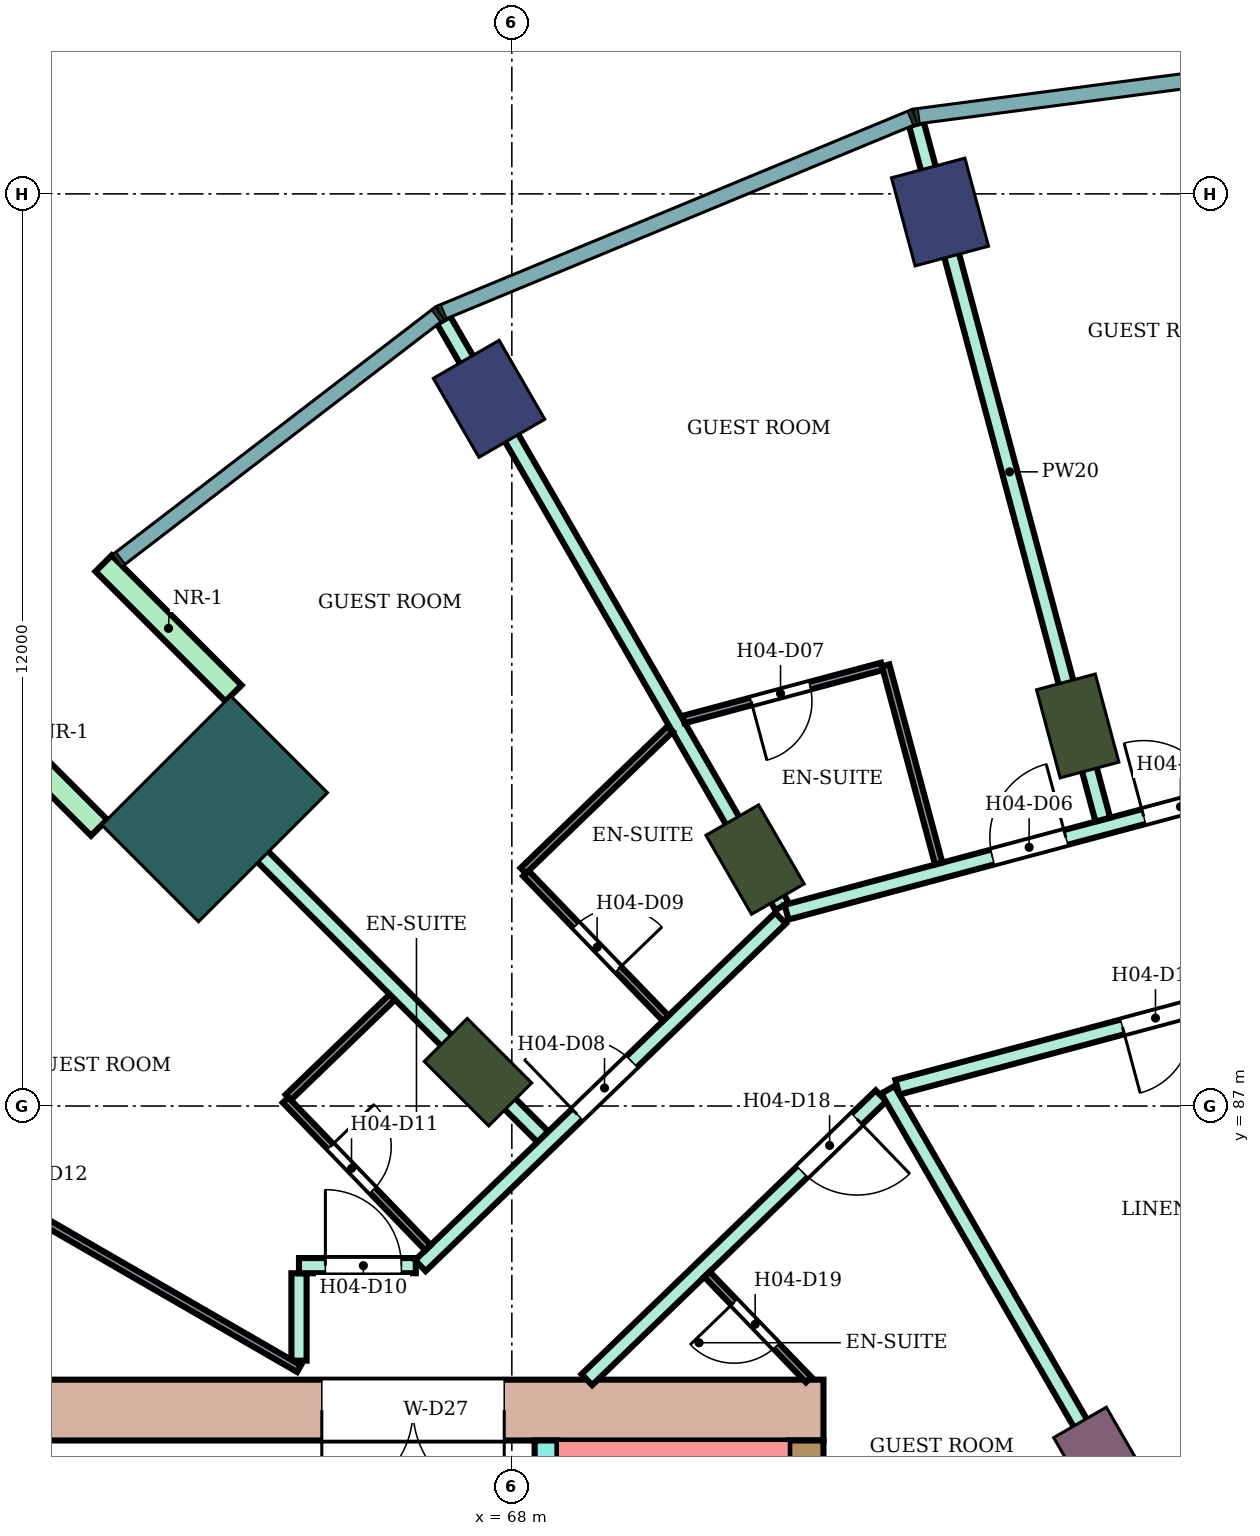
"""IFC4 building model, lengths in metres.
Left out: names, types, materials, properties, quantities, classifications, styles, units other than length and angle.
Written with IfcOpenShell. Run it as: python <this file> out.ifc"""

import sys

from ifc_helpers import new_model, si_unit, direction, frame, frame_2d, origin, origin_2d, place, context, subcontext, project, spatial, rectangle, extrude, element, fill, save


model = new_model("IFC4")
c1 = context("Model", 3, precision=1e-05, world=origin(), true_north=direction((0.0, 1.0)))
c2 = subcontext(c1, "Body", "Model", "MODEL_VIEW")
j1 = project(units=[si_unit("LENGTHUNIT", "METRE"), si_unit("PLANEANGLEUNIT", "RADIAN")], contexts=[c1])
p1 = place(None, origin())
s1 = spatial("IfcSite", under=j1, at=p1, CompositionType="ELEMENT")
p2 = place(p1, origin())
s2 = spatial("IfcBuilding", under=s1, at=p2, CompositionType="ELEMENT")
p3 = place(p2, frame((0.0, 0.0, 70.6)))
s3 = spatial("IfcBuildingStorey", under=s2, at=p3, CompositionType="ELEMENT", Elevation=70.6)
for number, where, z_axis, x_axis in (
    (1, (73.633, 98.762, 0.0), (0.0, 0.0, 1.0), (-0.259, 0.966, 0.0)),
    (2, (67.7, 96.304, 0.0), (0.0, 0.0, 1.0), (-0.5, 0.866, 0.0)),
):
    element("IfcColumn", number, at=place(p3, frame(where, z_axis=z_axis, x_axis=x_axis)), inside=s3, PredefinedType="COLUMN", context=c2, shape_type="SweptSolid", body=[
        extrude(rectangle(XDim=1.2, YDim=1.0, at=origin_2d()), origin(), (0.0, 0.0, 1.0), 3.8),
    ])
for number, where, z_axis, x_axis in (
    (3, (75.445, 92.0, 0.0), (0.0, 0.0, 1.0), (-0.259, 0.966, 0.0)),
    (4, (71.2, 90.242, 0.0), (0.0, 0.0, 1.0), (-0.5, 0.866, 0.0)),
    (5, (67.555, 87.445, 0.0), (0.0, 0.0, 1.0), (-0.707, 0.707, 0.0)),
):
    element("IfcColumn", number, at=place(p3, frame(where, z_axis=z_axis, x_axis=x_axis)), inside=s3, PredefinedType="COLUMN", context=c2, shape_type="SweptSolid", body=[
        extrude(rectangle(XDim=1.2, YDim=0.8, at=origin_2d()), origin(), (0.0, 0.0, 1.0), 3.8),
    ])
p4 = place(p3, frame((75.7, 82.448, 0.0), z_axis=(0.0, 0.0, 1.0), x_axis=(-0.5, 0.866025403784, 0.0)))
e6 = element("IfcColumn", 6, at=p4, inside=s3, PredefinedType="COLUMN", context=c2, shape_type="SweptSolid", body=[
    extrude(rectangle(XDim=0.9, YDim=0.8, at=origin_2d()), origin(), (0.0, 0.0, 1.0), 3.8),
])
p5 = place(p3, frame((64.09, 90.91, 0.0), z_axis=(0.0, 0.0, 1.0), x_axis=(-0.707106781187, 0.707106781187, 0.0)))
e7 = element("IfcColumn", 7, at=p5, inside=s3, PredefinedType="COLUMN", context=c2, shape_type="SweptSolid", body=[
    extrude(rectangle(XDim=1.8, YDim=2.4, at=origin_2d()), origin(), (0.0, 0.0, 1.0), 3.8),
])
p6 = place(p3, frame((72.1, 83.0, 0.0), z_axis=(0.0, 0.0, 1.0), x_axis=(-1.0, 0.0, 0.0)))
e8 = element("IfcWall", 8, at=p6, inside=s3, PredefinedType="SHEAR", context=c2, shape_type="SweptSolid", body=[
    extrude(rectangle(XDim=14.7, YDim=0.8, at=frame_2d((7.35, 0.0))), origin(), (0.0, 0.0, 1.0), 3.4),
])
p7 = place(p6, frame((4.2, 0.0, 0.0)))
e9 = element("IfcOpeningElement", 9, at=p7, cuts=e8, PredefinedType="OPENING", context=c2, shape_type="SweptSolid", body=[
    extrude(rectangle(XDim=2.4, YDim=2.4, at=frame_2d((1.2, 1.2))), frame((0.0, 0.41, 0.0), z_axis=(0.0, -1.0, 0.0), x_axis=(1.0, 0.0, 0.0)), (0.0, 0.0, 1.0), 0.82),
])
p8 = place(p3, frame((71.875, 82.6, 0.0), z_axis=(0.0, 0.0, 1.0), x_axis=(0.0, -1.0, 0.0)))
e10 = element("IfcWall", 10, at=p8, inside=s3, PredefinedType="SHEAR", context=c2, shape_type="SweptSolid", body=[
    extrude(rectangle(XDim=7.6, YDim=0.45, at=frame_2d((3.8, 0.0))), origin(), (0.0, 0.0, 1.0), 3.4),
])
p9 = place(p3, frame((68.45, 82.6, 0.0), z_axis=(0.0, 0.0, 1.0), x_axis=(0.0, -1.0, 0.0)))
e11 = element("IfcWall", 11, at=p9, inside=s3, PredefinedType="SHEAR", context=c2, shape_type="SweptSolid", body=[
    extrude(rectangle(XDim=7.6, YDim=0.3, at=frame_2d((3.8, 0.0))), origin(), (0.0, 0.0, 1.0), 3.4),
])
p10 = place(p9, frame((0.25, 0.0, 0.0)))
e12 = element("IfcOpeningElement", 12, at=p10, cuts=e11, PredefinedType="OPENING", context=c2, shape_type="SweptSolid", body=[
    extrude(rectangle(XDim=0.9, YDim=2.1, at=frame_2d((0.45, 1.05))), frame((0.0, 0.16, 0.0), z_axis=(0.0, -1.0, 0.0), x_axis=(1.0, 0.0, 0.0)), (0.0, 0.0, 1.0), 0.32),
])
for number, where, z_axis, x_axis in (
    (13, (64.338, 92.43, 0.0), (0.0, 0.0, 1.0), (-0.707, 0.707, 0.0)),
    (14, (62.57, 90.662, 0.0), (0.0, 0.0, 1.0), (-0.707, 0.707, 0.0)),
):
    element("IfcWall", number, at=place(p3, frame(where, z_axis=z_axis, x_axis=x_axis)), inside=s3, PredefinedType="NOTDEFINED", context=c2, shape_type="SweptSolid", body=[
        extrude(rectangle(XDim=2.416, YDim=0.3, at=frame_2d((1.208, 0.0))), origin(), (0.0, 0.0, 1.0), 3.8),
    ])
p11 = place(p3, frame((80.0, 82.604, 0.0), z_axis=(0.0, 0.0, 1.0), x_axis=(-0.965933654434, -0.258789828301, 0.0)))
e15 = element("IfcWall", 15, at=p11, inside=s3, PredefinedType="NOTDEFINED", context=c2, shape_type="SweptSolid", body=[
    extrude(rectangle(XDim=3.936, YDim=0.2, at=frame_2d((1.968, 0.0))), origin(), (0.0, 0.0, 1.0), 3.8),
])
p12 = place(p11, frame((0.468, 0.0, 0.9)))
e16 = element("IfcOpeningElement", 16, at=p12, cuts=e15, PredefinedType="OPENING", context=c2, shape_type="SweptSolid", body=[
    extrude(rectangle(XDim=3.0, YDim=2.3, at=frame_2d((1.5, 1.15))), frame((0.0, 0.11, 0.0), z_axis=(0.0, -1.0, 0.0), x_axis=(1.0, 0.0, 0.0)), (0.0, 0.0, 1.0), 0.22),
])
p13 = place(p3, frame((63.598, 91.407, 0.0), z_axis=(0.0, 0.0, 1.0), x_axis=(0.706981202484, -0.707232337591, 0.0)))
e17 = element("IfcWall", 17, at=p13, inside=s3, PredefinedType="PARTITIONING", context=c2, shape_type="SweptSolid", body=[
    extrude(rectangle(XDim=6.805, YDim=0.2, at=frame_2d((3.402, 0.0))), origin(), (0.0, 0.0, 1.0), 3.35),
])
p14 = place(p3, frame((65.2, 83.65, 0.0), z_axis=(0.0, 0.0, 1.0), x_axis=(0.0, 1.0, 0.0)))
e18 = element("IfcWall", 18, at=p14, inside=s3, PredefinedType="PARTITIONING", context=c2, shape_type="SweptSolid", body=[
    extrude(rectangle(XDim=1.15, YDim=0.2, at=frame_2d((0.575, 0.0))), origin(), (0.0, 0.0, 1.0), 3.35),
])
p15 = place(p3, frame((65.2, 84.9, 0.0), z_axis=(0.0, 0.0, 1.0), x_axis=(1.0, 0.0, 0.0)))
e19 = element("IfcWall", 19, at=p15, inside=s3, PredefinedType="PARTITIONING", context=c2, shape_type="SweptSolid", body=[
    extrude(rectangle(XDim=1.537, YDim=0.2, at=frame_2d((0.769, 0.0))), origin(), (0.0, 0.0, 1.0), 3.35),
])
p16 = place(p15, frame((0.347, 0.0, 0.0)))
e20 = element("IfcOpeningElement", 20, at=p16, cuts=e19, PredefinedType="OPENING", context=c2, shape_type="SweptSolid", body=[
    extrude(rectangle(XDim=1.0, YDim=2.1, at=frame_2d((0.5, 1.05))), frame((0.0, 0.11, 0.0), z_axis=(0.0, -1.0, 0.0), x_axis=(1.0, 0.0, 0.0)), (0.0, 0.0, 1.0), 0.22),
])
p17 = place(p3, frame((66.797, 84.9, 0.0), z_axis=(0.0, 0.0, 1.0), x_axis=(0.719692092412, 0.694293376116, 0.0)))
e21 = element("IfcWall", 21, at=p17, inside=s3, PredefinedType="PARTITIONING", context=c2, shape_type="SweptSolid", body=[
    extrude(rectangle(XDim=6.584, YDim=0.2, at=frame_2d((3.292, 0.0))), origin(), (0.0, 0.0, 1.0), 3.35),
])
p18 = place(p17, frame((2.866, 0.0, 0.0)))
e22 = element("IfcOpeningElement", 22, at=p18, cuts=e21, PredefinedType="OPENING", context=c2, shape_type="SweptSolid", body=[
    extrude(rectangle(XDim=1.0, YDim=2.1, at=frame_2d((0.5, 1.05))), frame((0.0, 0.11, 0.0), z_axis=(0.0, -1.0, 0.0), x_axis=(1.0, 0.0, 0.0)), (0.0, 0.0, 1.0), 0.22),
])
p19 = place(p3, frame((67.101, 97.342, 0.0), z_axis=(0.0, 0.0, 1.0), x_axis=(0.499932813297, -0.866064190571, 0.0)))
e23 = element("IfcWall", 23, at=p19, inside=s3, PredefinedType="PARTITIONING", context=c2, shape_type="SweptSolid", body=[
    extrude(rectangle(XDim=8.908, YDim=0.2, at=frame_2d((4.454, 0.0))), origin(), (0.0, 0.0, 1.0), 3.35),
])
p20 = place(p3, frame((68.987, 83.4, 0.0), z_axis=(0.0, 0.0, 1.0), x_axis=(0.719591503389, 0.694397629784, 0.0)))
e24 = element("IfcWall", 24, at=p20, inside=s3, PredefinedType="PARTITIONING", context=c2, shape_type="SweptSolid", body=[
    extrude(rectangle(XDim=5.378, YDim=0.2, at=frame_2d((2.689, 0.0))), origin(), (0.0, 0.0, 1.0), 3.35),
])
p21 = place(p20, frame((3.938, 0.0, 0.0)))
e25 = element("IfcOpeningElement", 25, at=p21, cuts=e24, PredefinedType="OPENING", context=c2, shape_type="SweptSolid", body=[
    extrude(rectangle(XDim=1.0, YDim=2.1, at=frame_2d((0.5, 1.05))), frame((0.0, 0.11, 0.0), z_axis=(0.0, -1.0, 0.0), x_axis=(1.0, 0.0, 0.0)), (0.0, 0.0, 1.0), 0.22),
])
p22 = place(p3, frame((71.614, 89.55, 0.0), z_axis=(0.0, 0.0, 1.0), x_axis=(0.965982156828, 0.258608725086, 0.0)))
e26 = element("IfcWall", 26, at=p22, inside=s3, PredefinedType="PARTITIONING", context=c2, shape_type="SweptSolid", body=[
    extrude(rectangle(XDim=8.592, YDim=0.2, at=frame_2d((4.296, 0.0))), origin(), (0.0, 0.0, 1.0), 3.35),
])
p23 = place(p22, frame((4.865, 0.0, 0.0)))
e27 = element("IfcOpeningElement", 27, at=p23, cuts=e26, PredefinedType="OPENING", context=c2, shape_type="SweptSolid", body=[
    extrude(rectangle(XDim=1.0, YDim=2.1, at=frame_2d((0.5, 1.05))), frame((0.0, 0.11, 0.0), z_axis=(0.0, -1.0, 0.0), x_axis=(1.0, 0.0, 0.0)), (0.0, 0.0, 1.0), 0.22),
])
p24 = place(p22, frame((2.804, 0.0, 0.0)))
e28 = element("IfcOpeningElement", 28, at=p24, cuts=e26, PredefinedType="OPENING", context=c2, shape_type="SweptSolid", body=[
    extrude(rectangle(XDim=1.0, YDim=2.1, at=frame_2d((0.5, 1.05))), frame((0.0, 0.11, 0.0), z_axis=(0.0, -1.0, 0.0), x_axis=(1.0, 0.0, 0.0)), (0.0, 0.0, 1.0), 0.22),
])
p25 = place(p3, frame((73.071, 87.247, 0.0), z_axis=(0.0, 0.0, 1.0), x_axis=(0.965914318977, 0.258861987157, 0.0)))
e29 = element("IfcWall", 29, at=p25, inside=s3, PredefinedType="PARTITIONING", context=c2, shape_type="SweptSolid", body=[
    extrude(rectangle(XDim=7.043, YDim=0.2, at=frame_2d((3.521, 0.0))), origin(), (0.0, 0.0, 1.0), 3.35),
])
p26 = place(p25, frame((3.067, 0.0, 0.0)))
e30 = element("IfcOpeningElement", 30, at=p26, cuts=e29, PredefinedType="OPENING", context=c2, shape_type="SweptSolid", body=[
    extrude(rectangle(XDim=0.9, YDim=2.1, at=frame_2d((0.45, 1.05))), frame((0.0, 0.11, 0.0), z_axis=(0.0, -1.0, 0.0), x_axis=(1.0, 0.0, 0.0)), (0.0, 0.0, 1.0), 0.22),
])
p27 = place(p3, frame((72.948, 87.214, 0.0), z_axis=(0.0, 0.0, 1.0), x_axis=(0.499927021214, -0.866067534006, 0.0)))
e31 = element("IfcWall", 31, at=p27, inside=s3, PredefinedType="PARTITIONING", context=c2, shape_type="SweptSolid", body=[
    extrude(rectangle(XDim=6.405, YDim=0.2, at=frame_2d((3.203, 0.0))), origin(), (0.0, 0.0, 1.0), 3.35),
])
p28 = place(p3, frame((73.323, 99.919, 0.0), z_axis=(0.0, 0.0, 1.0), x_axis=(0.258817230439, -0.965926312525, 0.0)))
e32 = element("IfcWall", 32, at=p28, inside=s3, PredefinedType="PARTITIONING", context=c2, shape_type="SweptSolid", body=[
    extrude(rectangle(XDim=9.474, YDim=0.2, at=frame_2d((4.737, 0.0))), origin(), (0.0, 0.0, 1.0), 3.35),
])
p29 = place(p3, frame((57.659, 87.899, 0.0), z_axis=(0.0, 0.0, 1.0), x_axis=(0.86602264145, -0.500004784474, 0.0)))
e33 = element("IfcWall", 33, at=p29, inside=s3, PredefinedType="PARTITIONING", context=c2, shape_type="SweptSolid", body=[
    extrude(rectangle(XDim=8.708, YDim=0.1, at=frame_2d((4.354, 0.0))), origin(), (0.0, 0.0, 1.0), 3.35),
])
p30 = place(p29, frame((3.929, 0.0, 0.0)))
e34 = element("IfcOpeningElement", 34, at=p30, cuts=e33, PredefinedType="OPENING", context=c2, shape_type="SweptSolid", body=[
    extrude(rectangle(XDim=0.9, YDim=2.1, at=frame_2d((0.45, 1.05))), frame((0.0, 0.06, 0.0), z_axis=(0.0, -1.0, 0.0), x_axis=(1.0, 0.0, 0.0)), (0.0, 0.0, 1.0), 0.12),
])
p31 = place(p3, frame((65.059, 87.114, 0.0), z_axis=(0.0, 0.0, 1.0), x_axis=(0.719715847356, 0.694268751324, 0.0)))
e35 = element("IfcWall", 35, at=p31, inside=s3, PredefinedType="PARTITIONING", context=c2, shape_type="SweptSolid", body=[
    extrude(rectangle(XDim=1.9, YDim=0.1, at=frame_2d((0.95, 0.0))), origin(), (0.0, 0.0, 1.0), 3.35),
])
p32 = place(p3, frame((65.023, 87.079, 0.0), z_axis=(0.0, 0.0, 1.0), x_axis=(0.694287838235, -0.719697434815, 0.0)))
e36 = element("IfcWall", 36, at=p32, inside=s3, PredefinedType="PARTITIONING", context=c2, shape_type="SweptSolid", body=[
    extrude(rectangle(XDim=2.7, YDim=0.1, at=frame_2d((1.35, 0.0))), origin(), (0.0, 0.0, 1.0), 3.35),
])
p33 = place(p32, frame((0.85, 0.0, 0.0)))
e37 = element("IfcOpeningElement", 37, at=p33, cuts=e36, PredefinedType="OPENING", context=c2, shape_type="SweptSolid", body=[
    extrude(rectangle(XDim=0.8, YDim=2.1, at=frame_2d((0.4, 1.05))), frame((0.0, 0.06, 0.0), z_axis=(0.0, -1.0, 0.0), x_axis=(1.0, 0.0, 0.0)), (0.0, 0.0, 1.0), 0.12),
])
p34 = place(p3, frame((68.185, 90.06, 0.0), z_axis=(0.0, 0.0, 1.0), x_axis=(0.69446127412, -0.719530081892, 0.0)))
e38 = element("IfcWall", 38, at=p34, inside=s3, PredefinedType="PARTITIONING", context=c2, shape_type="SweptSolid", body=[
    extrude(rectangle(XDim=2.649, YDim=0.1, at=frame_2d((1.324, 0.0))), origin(), (0.0, 0.0, 1.0), 3.35),
])
p35 = place(p34, frame((0.95, 0.0, 0.0)))
e39 = element("IfcOpeningElement", 39, at=p35, cuts=e38, PredefinedType="OPENING", context=c2, shape_type="SweptSolid", body=[
    extrude(rectangle(XDim=0.8, YDim=2.1, at=frame_2d((0.4, 1.05))), frame((0.0, 0.06, 0.0), z_axis=(0.0, -1.0, 0.0), x_axis=(1.0, 0.0, 0.0)), (0.0, 0.0, 1.0), 0.12),
])
p36 = place(p3, frame((68.15, 90.096, 0.0), z_axis=(0.0, 0.0, 1.0), x_axis=(0.719669144226, 0.694317163009, 0.0)))
e40 = element("IfcWall", 40, at=p36, inside=s3, PredefinedType="PARTITIONING", context=c2, shape_type="SweptSolid", body=[
    extrude(rectangle(XDim=2.687, YDim=0.1, at=frame_2d((1.343, 0.0))), origin(), (0.0, 0.0, 1.0), 3.35),
])
p37 = place(p3, frame((70.258, 92.085, 0.0), z_axis=(0.0, 0.0, 1.0), x_axis=(0.965948051503, 0.258736085224, 0.0)))
e41 = element("IfcWall", 41, at=p37, inside=s3, PredefinedType="PARTITIONING", context=c2, shape_type="SweptSolid", body=[
    extrude(rectangle(XDim=2.703, YDim=0.1, at=frame_2d((1.352, 0.0))), origin(), (0.0, 0.0, 1.0), 3.35),
])
p38 = place(p37, frame((0.922, 0.0, 0.0)))
e42 = element("IfcOpeningElement", 42, at=p38, cuts=e41, PredefinedType="OPENING", context=c2, shape_type="SweptSolid", body=[
    extrude(rectangle(XDim=0.8, YDim=2.1, at=frame_2d((0.4, 1.05))), frame((0.0, 0.06, 0.0), z_axis=(0.0, -1.0, 0.0), x_axis=(1.0, 0.0, 0.0)), (0.0, 0.0, 1.0), 0.12),
])
p39 = place(p3, frame((70.567, 84.786, 0.0), z_axis=(0.0, 0.0, 1.0), x_axis=(0.694447472534, -0.719543402368, 0.0)))
e43 = element("IfcWall", 43, at=p39, inside=s3, PredefinedType="PARTITIONING", context=c2, shape_type="SweptSolid", body=[
    extrude(rectangle(XDim=1.926, YDim=0.1, at=frame_2d((0.963, 0.0))), origin(), (0.0, 0.0, 1.0), 3.35),
])
p40 = place(p39, frame((0.513, 0.0, 0.0)))
e44 = element("IfcOpeningElement", 44, at=p40, cuts=e43, PredefinedType="OPENING", context=c2, shape_type="SweptSolid", body=[
    extrude(rectangle(XDim=0.8, YDim=2.1, at=frame_2d((0.4, 1.05))), frame((0.0, 0.06, 0.0), z_axis=(0.0, -1.0, 0.0), x_axis=(1.0, 0.0, 0.0)), (0.0, 0.0, 1.0), 0.12),
])
p41 = place(p3, frame((72.918, 92.797, 0.0), z_axis=(0.0, 0.0, 1.0), x_axis=(0.25867580527, -0.965964195904, 0.0)))
e45 = element("IfcWall", 45, at=p41, inside=s3, PredefinedType="PARTITIONING", context=c2, shape_type="SweptSolid", body=[
    extrude(rectangle(XDim=2.699, YDim=0.1, at=frame_2d((1.35, 0.0))), origin(), (0.0, 0.0, 1.0), 3.35),
])
p42 = place(p12, origin())
e46 = element("IfcWindow", 46, at=p42, inside=s3, PartitioningType="SINGLE_PANEL", PredefinedType="WINDOW", context=c2, shape_type="SweptSolid", body=[
    extrude(rectangle(XDim=3.0, YDim=2.3, at=frame_2d((1.5, 1.15))), frame((0.0, 0.03, 0.0), z_axis=(0.0, -1.0, 0.0), x_axis=(1.0, 0.0, 0.0)), (0.0, 0.0, 1.0), 0.06),
])
fill(e16, e46)
p43 = place(p23, origin())
e47 = element("IfcDoor", 47, at=p43, inside=s3, OperationType="SINGLE_SWING_LEFT", PredefinedType="DOOR", context=c2, shape_type="SweptSolid", body=[
    extrude(rectangle(XDim=1.0, YDim=2.1, at=frame_2d((0.5, 1.05))), frame((0.0, 0.025, 0.0), z_axis=(0.0, -1.0, 0.0), x_axis=(1.0, 0.0, 0.0)), (0.0, 0.0, 1.0), 0.05),
])
fill(e27, e47)
p44 = place(p24, origin())
e48 = element("IfcDoor", 48, at=p44, inside=s3, OperationType="SINGLE_SWING_RIGHT", PredefinedType="DOOR", context=c2, shape_type="SweptSolid", body=[
    extrude(rectangle(XDim=1.0, YDim=2.1, at=frame_2d((0.5, 1.05))), frame((0.0, 0.025, 0.0), z_axis=(0.0, -1.0, 0.0), x_axis=(1.0, 0.0, 0.0)), (0.0, 0.0, 1.0), 0.05),
])
fill(e28, e48)
p45 = place(p38, frame((0.8, 0.0, 0.0), z_axis=(0.0, 0.0, 1.0), x_axis=(-1.0, 0.0, 0.0)))
e49 = element("IfcDoor", 49, at=p45, inside=s3, OperationType="SINGLE_SWING_RIGHT", PredefinedType="DOOR", context=c2, shape_type="SweptSolid", body=[
    extrude(rectangle(XDim=0.8, YDim=2.1, at=frame_2d((0.4, 1.05))), frame((0.0, 0.025, 0.0), z_axis=(0.0, -1.0, 0.0), x_axis=(1.0, 0.0, 0.0)), (0.0, 0.0, 1.0), 0.05),
])
fill(e42, e49)
p46 = place(p18, origin())
e50 = element("IfcDoor", 50, at=p46, inside=s3, OperationType="SINGLE_SWING_LEFT", PredefinedType="DOOR", context=c2, shape_type="SweptSolid", body=[
    extrude(rectangle(XDim=1.0, YDim=2.1, at=frame_2d((0.5, 1.05))), frame((0.0, 0.025, 0.0), z_axis=(0.0, -1.0, 0.0), x_axis=(1.0, 0.0, 0.0)), (0.0, 0.0, 1.0), 0.05),
])
fill(e22, e50)
p47 = place(p35, origin())
e51 = element("IfcDoor", 51, at=p47, inside=s3, OperationType="SINGLE_SWING_RIGHT", PredefinedType="DOOR", context=c2, shape_type="SweptSolid", body=[
    extrude(rectangle(XDim=0.8, YDim=2.1, at=frame_2d((0.4, 1.05))), frame((0.0, 0.025, 0.0), z_axis=(0.0, -1.0, 0.0), x_axis=(1.0, 0.0, 0.0)), (0.0, 0.0, 1.0), 0.05),
])
fill(e39, e51)
p48 = place(p16, origin())
e52 = element("IfcDoor", 52, at=p48, inside=s3, OperationType="SINGLE_SWING_LEFT", PredefinedType="DOOR", context=c2, shape_type="SweptSolid", body=[
    extrude(rectangle(XDim=1.0, YDim=2.1, at=frame_2d((0.5, 1.05))), frame((0.0, 0.025, 0.0), z_axis=(0.0, -1.0, 0.0), x_axis=(1.0, 0.0, 0.0)), (0.0, 0.0, 1.0), 0.05),
])
fill(e20, e52)
p49 = place(p33, origin())
e53 = element("IfcDoor", 53, at=p49, inside=s3, OperationType="SINGLE_SWING_LEFT", PredefinedType="DOOR", context=c2, shape_type="SweptSolid", body=[
    extrude(rectangle(XDim=0.8, YDim=2.1, at=frame_2d((0.4, 1.05))), frame((0.0, 0.025, 0.0), z_axis=(0.0, -1.0, 0.0), x_axis=(1.0, 0.0, 0.0)), (0.0, 0.0, 1.0), 0.05),
])
fill(e37, e53)
p50 = place(p26, frame((0.9, 0.0, 0.0), z_axis=(0.0, 0.0, 1.0), x_axis=(-1.0, 0.0, 0.0)))
e54 = element("IfcDoor", 54, at=p50, inside=s3, OperationType="SINGLE_SWING_RIGHT", PredefinedType="DOOR", context=c2, shape_type="SweptSolid", body=[
    extrude(rectangle(XDim=0.9, YDim=2.1, at=frame_2d((0.45, 1.05))), frame((0.0, 0.025, 0.0), z_axis=(0.0, -1.0, 0.0), x_axis=(1.0, 0.0, 0.0)), (0.0, 0.0, 1.0), 0.05),
])
fill(e30, e54)
p51 = place(p21, frame((1.0, 0.0, 0.0), z_axis=(0.0, 0.0, 1.0), x_axis=(-1.0, 0.0, 0.0)))
e55 = element("IfcDoor", 55, at=p51, inside=s3, OperationType="SINGLE_SWING_LEFT", PredefinedType="DOOR", context=c2, shape_type="SweptSolid", body=[
    extrude(rectangle(XDim=1.0, YDim=2.1, at=frame_2d((0.5, 1.05))), frame((0.0, 0.025, 0.0), z_axis=(0.0, -1.0, 0.0), x_axis=(1.0, 0.0, 0.0)), (0.0, 0.0, 1.0), 0.05),
])
fill(e25, e55)
p52 = place(p40, frame((0.8, 0.0, 0.0), z_axis=(0.0, 0.0, 1.0), x_axis=(-1.0, 0.0, 0.0)))
e56 = element("IfcDoor", 56, at=p52, inside=s3, OperationType="SINGLE_SWING_RIGHT", PredefinedType="DOOR", context=c2, shape_type="SweptSolid", body=[
    extrude(rectangle(XDim=0.8, YDim=2.1, at=frame_2d((0.4, 1.05))), frame((0.0, 0.025, 0.0), z_axis=(0.0, -1.0, 0.0), x_axis=(1.0, 0.0, 0.0)), (0.0, 0.0, 1.0), 0.05),
])
fill(e44, e56)
p53 = place(p7, origin())
e57 = element("IfcDoor", 57, at=p53, inside=s3, OperationType="DOUBLE_DOOR_SINGLE_SWING", PredefinedType="DOOR", context=c2, shape_type="SweptSolid", body=[
    extrude(rectangle(XDim=2.4, YDim=2.4, at=frame_2d((1.2, 1.2))), frame((0.0, 0.025, 0.0), z_axis=(0.0, -1.0, 0.0), x_axis=(1.0, 0.0, 0.0)), (0.0, 0.0, 1.0), 0.05),
])
fill(e9, e57)
save(model, sys.argv[1])
